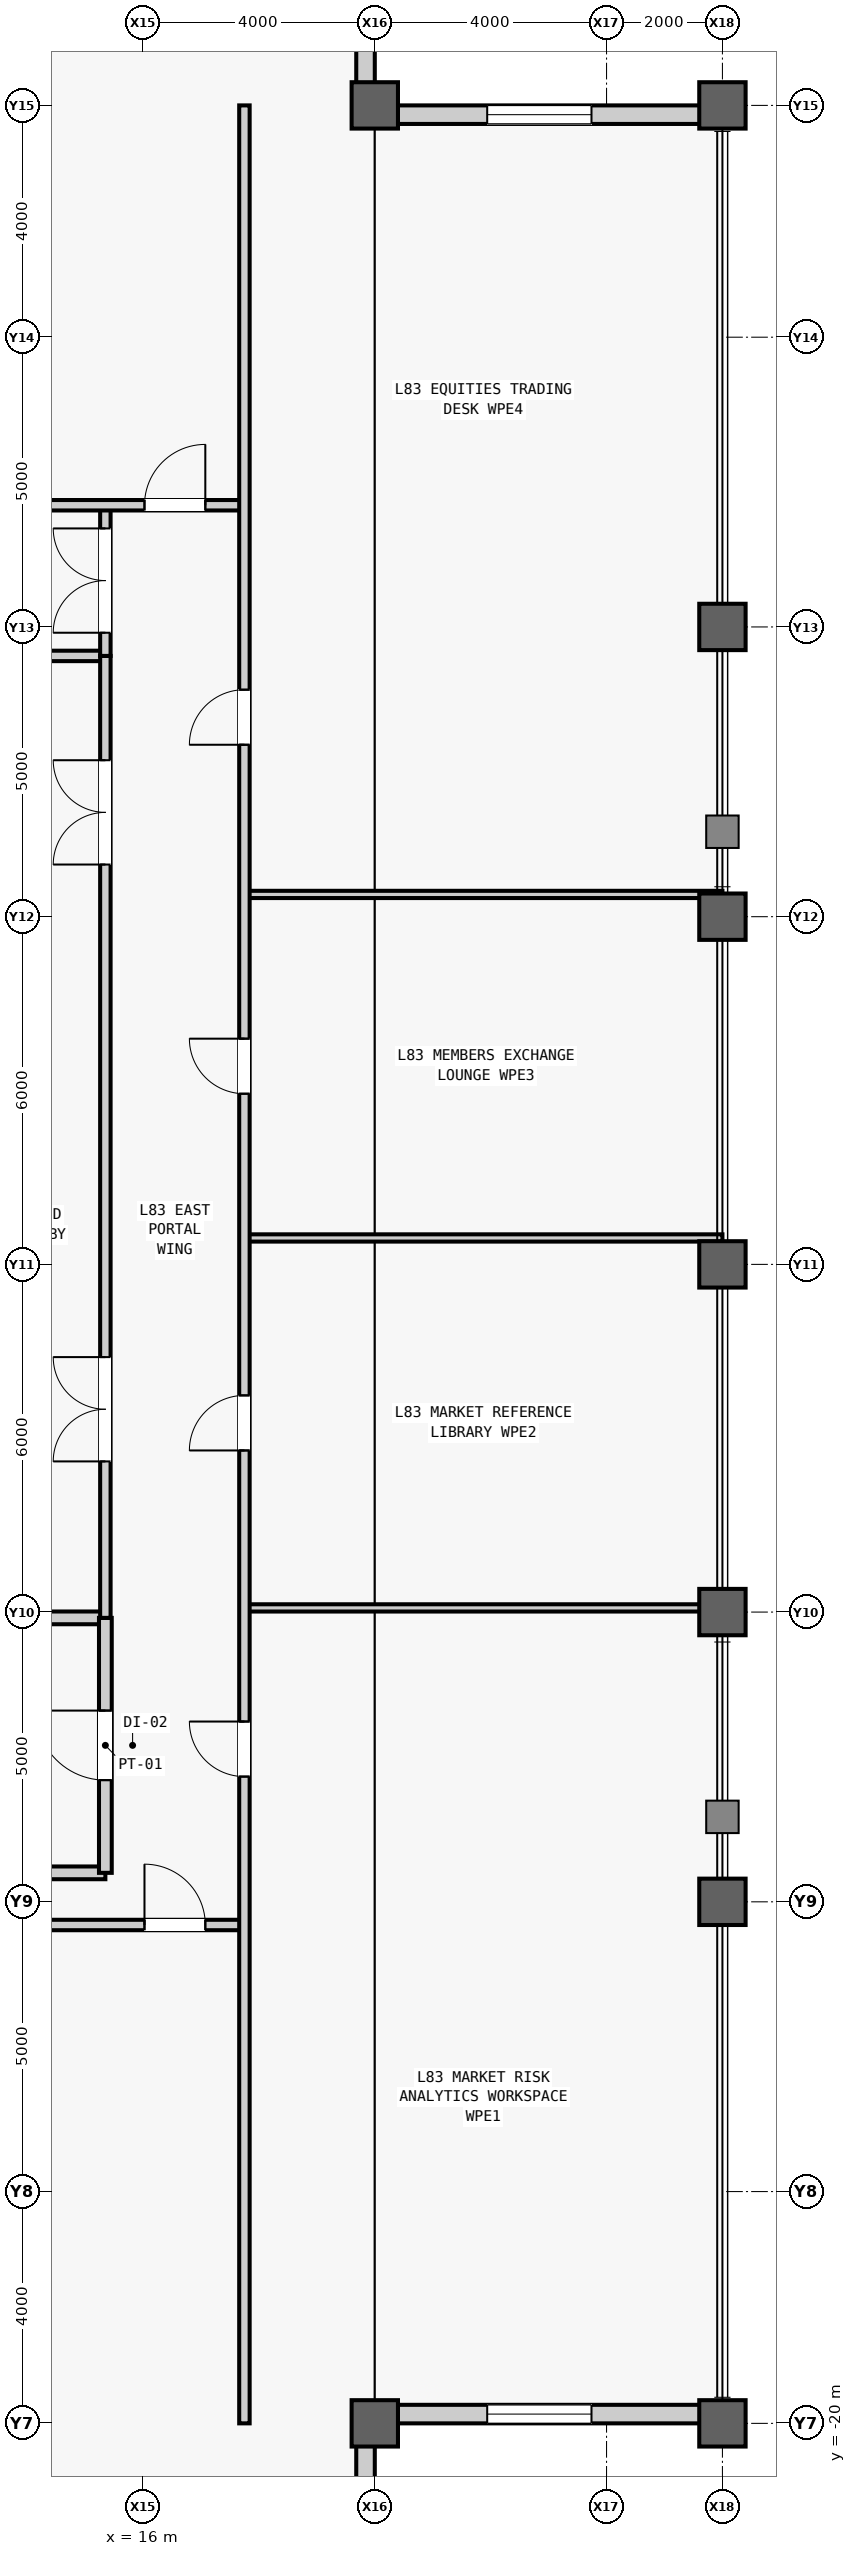
"""IFC4 building model, lengths in metres.
Left out: names, types, materials, properties, quantities, classifications, styles, units other than length and angle.
Written with IfcOpenShell. Run it as: python <this file> out.ifc"""

import sys

from ifc_helpers import new_model, si_unit, direction, frame, frame_2d, origin, origin_2d, place, context, subcontext, project, spatial, rectangle, hollow_rectangle, extrude, source, transform, mapped, element, fill, save


model = new_model("IFC4")
c1 = context("Model", 3, precision=1e-05, world=origin(), true_north=direction((0.0, 1.0)))
c2 = subcontext(c1, "Body", "Model", "MODEL_VIEW")
j1 = project(units=[si_unit("LENGTHUNIT", "METRE"), si_unit("PLANEANGLEUNIT", "RADIAN")], contexts=[c1])
p1 = place(None, origin())
s1 = spatial("IfcSite", under=j1, at=p1, CompositionType="ELEMENT")
p2 = place(p1, origin())
s2 = spatial("IfcBuilding", under=s1, at=p2, CompositionType="ELEMENT")
p3 = place(p2, frame((0.0, 0.0, 350.3)))
s3 = spatial("IfcBuildingStorey", under=s2, at=p3, CompositionType="ELEMENT", Elevation=350.3)
m1 = source(origin(), c2, "Body", "SweptSolid", [
    extrude(hollow_rectangle(XDim=0.8, YDim=0.8, WallThickness=0.045, at=origin_2d()), origin(), (0.0, 0.0, 1.0), 4.0),
])
for number, where, z_axis, x_axis in (
    (1, (20.0, -20.0, 0.0), (0.0, 0.0, 1.0), (1.0, 0.0, 0.0)),
    (2, (20.0, 20.0, 0.0), (0.0, 0.0, 1.0), (1.0, 0.0, 0.0)),
    (3, (26.0, -20.0, 0.0), (0.0, 0.0, 1.0), (1.0, 0.0, 0.0)),
    (4, (26.0, -11.0, 0.0), (0.0, 0.0, 1.0), (1.0, 0.0, 0.0)),
    (5, (26.0, -6.0, 0.0), (0.0, 0.0, 1.0), (1.0, 0.0, 0.0)),
    (6, (26.0, 0.0, 0.0), (0.0, 0.0, 1.0), (1.0, 0.0, 0.0)),
    (7, (26.0, 6.0, 0.0), (0.0, 0.0, 1.0), (1.0, 0.0, 0.0)),
    (8, (26.0, 11.0, 0.0), (0.0, 0.0, 1.0), (1.0, 0.0, 0.0)),
    (9, (26.0, 20.0, 0.0), (0.0, 0.0, 1.0), (1.0, 0.0, 0.0)),
):
    element("IfcColumn", number, at=place(p3, frame(where, z_axis=z_axis, x_axis=x_axis)), inside=s3, PredefinedType="COLUMN", context=c2, shape_type="MappedRepresentation", body=[
        mapped(m1, transform((0.0, 0.0, 0.0), scale=1.0)),
    ])
m2 = source(origin(), c2, "Body", "SweptSolid", [
    extrude(rectangle(XDim=5.68, YDim=0.32, at=frame_2d((2.84, 0.0))), origin(), (0.0, 0.0, 1.0), 3.191),
])
p4 = place(p3, frame((19.84, -25.68, 0.0), z_axis=(0.0, 0.0, 1.0), x_axis=(0.0, 1.0, 0.0)))
e10 = element("IfcWall", 10, at=p4, inside=s3, PredefinedType="STANDARD", context=c2, shape_type="MappedRepresentation", body=[
    mapped(m2, transform((0.0, 0.0, 0.0), scale=1.0)),
])
m3 = source(origin(), c2, "Body", "SweptSolid", [
    extrude(rectangle(XDim=1.8, YDim=2.4, at=frame_2d((0.9, 1.2))), frame((0.0, 0.17, 0.0), z_axis=(0.0, -1.0, 0.0), x_axis=(1.0, 0.0, 0.0)), (0.0, 0.0, 1.0), 0.34),
])
p5 = place(p4, frame((1.94, 0.0, 0.5)))
e11 = element("IfcOpeningElement", 11, at=p5, cuts=e10, PredefinedType="OPENING", context=c2, shape_type="MappedRepresentation", body=[
    mapped(m3, transform((0.0, 0.0, 0.0), scale=1.0)),
])
p6 = place(p3, frame((20.0, -19.84, 0.0), z_axis=(0.0, 0.0, 1.0), x_axis=(1.0, 0.0, 0.0)))
e12 = element("IfcWall", 12, at=p6, inside=s3, PredefinedType="STANDARD", context=c2, shape_type="MappedRepresentation", body=[
    mapped(m2, transform((0.0, 0.0, 0.0), scale=1.0)),
])
p7 = place(p6, frame((1.94, 0.0, 0.5)))
e13 = element("IfcOpeningElement", 13, at=p7, cuts=e12, PredefinedType="OPENING", context=c2, shape_type="MappedRepresentation", body=[
    mapped(m3, transform((0.0, 0.0, 0.0), scale=1.0)),
])
p8 = place(p3, frame((20.0, 19.84, 0.0), z_axis=(0.0, 0.0, 1.0), x_axis=(1.0, 0.0, 0.0)))
e14 = element("IfcWall", 14, at=p8, inside=s3, PredefinedType="STANDARD", context=c2, shape_type="MappedRepresentation", body=[
    mapped(m2, transform((0.0, 0.0, 0.0), scale=1.0)),
])
p9 = place(p8, frame((1.94, 0.0, 0.5)))
e15 = element("IfcOpeningElement", 15, at=p9, cuts=e14, PredefinedType="OPENING", context=c2, shape_type="MappedRepresentation", body=[
    mapped(m3, transform((0.0, 0.0, 0.0), scale=1.0)),
])
p10 = place(p3, frame((19.84, 20.0, 0.0), z_axis=(0.0, 0.0, 1.0), x_axis=(0.0, 1.0, 0.0)))
e16 = element("IfcWall", 16, at=p10, inside=s3, PredefinedType="STANDARD", context=c2, shape_type="MappedRepresentation", body=[
    mapped(m2, transform((0.0, 0.0, 0.0), scale=1.0)),
])
p11 = place(p10, frame((1.94, 0.0, 0.5)))
e17 = element("IfcOpeningElement", 17, at=p11, cuts=e16, PredefinedType="OPENING", context=c2, shape_type="MappedRepresentation", body=[
    mapped(m3, transform((0.0, 0.0, 0.0), scale=1.0)),
])
m4 = source(origin(), c2, "Body", "SweptSolid", [
    extrude(rectangle(XDim=4.05, YDim=0.22, at=frame_2d((2.025, 0.0))), origin(), (0.0, 0.0, 1.0), 3.74),
])
p12 = place(p3, frame((11.3, -10.5, 0.0), z_axis=(0.0, 0.0, 1.0), x_axis=(1.0, 0.0, 0.0)))
e18 = element("IfcWall", 18, at=p12, inside=s3, PredefinedType="PARTITIONING", context=c2, shape_type="MappedRepresentation", body=[
    mapped(m4, transform((0.0, 0.0, 0.0), scale=1.0)),
])
m5 = source(origin(), c2, "Body", "SweptSolid", [
    extrude(rectangle(XDim=4.05, YDim=0.22, at=frame_2d((2.025, 0.0))), origin(), (0.0, 0.0, 1.0), 3.124),
])
p13 = place(p3, frame((11.3, -6.1, 0.0), z_axis=(0.0, 0.0, 1.0), x_axis=(1.0, 0.0, 0.0)))
e19 = element("IfcWall", 19, at=p13, inside=s3, PredefinedType="PARTITIONING", context=c2, shape_type="MappedRepresentation", body=[
    mapped(m5, transform((0.0, 0.0, 0.0), scale=1.0)),
])
m6 = source(origin(), c2, "Body", "SweptSolid", [
    extrude(rectangle(XDim=4.4, YDim=0.22, at=frame_2d((2.2, 0.0))), origin(), (0.0, 0.0, 1.0), 3.74),
])
p14 = place(p3, frame((15.35, -10.5, 0.0), z_axis=(0.0, 0.0, 1.0), x_axis=(0.0, 1.0, 0.0)))
e20 = element("IfcWall", 20, at=p14, inside=s3, PredefinedType="PARTITIONING", context=c2, shape_type="MappedRepresentation", body=[
    mapped(m6, transform((0.0, 0.0, 0.0), scale=1.0)),
])
m7 = source(origin(), c2, "Body", "SweptSolid", [
    extrude(rectangle(XDim=1.2, YDim=2.2, at=frame_2d((0.6, 1.1))), frame((0.0, 0.12, 0.0), z_axis=(0.0, -1.0, 0.0), x_axis=(1.0, 0.0, 0.0)), (0.0, 0.0, 1.0), 0.24),
])
p15 = place(p14, frame((1.6, 0.0, 0.0)))
e21 = element("IfcOpeningElement", 21, at=p15, cuts=e20, PredefinedType="OPENING", context=c2, shape_type="MappedRepresentation", body=[
    mapped(m7, transform((0.0, 0.0, 0.0), scale=1.0)),
])
m8 = source(origin(), c2, "Body", "SweptSolid", [
    extrude(rectangle(XDim=4.05, YDim=0.18, at=frame_2d((2.025, 0.0))), origin(), (0.0, 0.0, 1.0), 3.74),
])
p16 = place(p3, frame((11.3, 10.5, 0.0), z_axis=(0.0, 0.0, 1.0), x_axis=(1.0, 0.0, 0.0)))
e22 = element("IfcWall", 22, at=p16, inside=s3, PredefinedType="PARTITIONING", context=c2, shape_type="MappedRepresentation", body=[
    mapped(m8, transform((0.0, 0.0, 0.0), scale=1.0)),
])
m9 = source(origin(), c2, "Body", "SweptSolid", [
    extrude(rectangle(XDim=16.6, YDim=0.18, at=frame_2d((8.3, 0.0))), origin(), (0.0, 0.0, 1.0), 3.74),
])
p17 = place(p3, frame((15.35, -6.1, 0.0), z_axis=(0.0, 0.0, 1.0), x_axis=(0.0, 1.0, 0.0)))
e23 = element("IfcWall", 23, at=p17, inside=s3, PredefinedType="PARTITIONING", context=c2, shape_type="MappedRepresentation", body=[
    mapped(m9, transform((0.0, 0.0, 0.0), scale=1.0)),
])
m10 = source(origin(), c2, "Body", "SweptSolid", [
    extrude(rectangle(XDim=1.8, YDim=2.25, at=frame_2d((0.9, 1.125))), frame((0.0, 0.1, 0.0), z_axis=(0.0, -1.0, 0.0), x_axis=(1.0, 0.0, 0.0)), (0.0, 0.0, 1.0), 0.2),
])
p18 = place(p17, frame((2.7, 0.0, 0.0)))
e24 = element("IfcOpeningElement", 24, at=p18, cuts=e23, PredefinedType="OPENING", context=c2, shape_type="MappedRepresentation", body=[
    mapped(m10, transform((0.0, 0.0, 0.0), scale=1.0)),
])
p19 = place(p17, frame((13.0, 0.0, 0.0)))
e25 = element("IfcOpeningElement", 25, at=p19, cuts=e23, PredefinedType="OPENING", context=c2, shape_type="MappedRepresentation", body=[
    mapped(m10, transform((0.0, 0.0, 0.0), scale=1.0)),
])
m11 = source(origin(), c2, "Body", "SweptSolid", [
    extrude(rectangle(XDim=2.6, YDim=0.18, at=frame_2d((1.3, 0.0))), origin(), (0.0, 0.0, 1.0), 3.74),
])
p20 = place(p3, frame((15.35, 10.5, 0.0), z_axis=(0.0, 0.0, 1.0), x_axis=(0.0, 1.0, 0.0)))
e26 = element("IfcWall", 26, at=p20, inside=s3, PredefinedType="PARTITIONING", context=c2, shape_type="MappedRepresentation", body=[
    mapped(m11, transform((0.0, 0.0, 0.0), scale=1.0)),
])
p21 = place(p20, frame((0.4, 0.0, 0.0)))
e27 = element("IfcOpeningElement", 27, at=p21, cuts=e26, PredefinedType="OPENING", context=c2, shape_type="MappedRepresentation", body=[
    mapped(m10, transform((0.0, 0.0, 0.0), scale=1.0)),
])
m12 = source(origin(), c2, "Body", "SweptSolid", [
    extrude(rectangle(XDim=12.7, YDim=0.18, at=frame_2d((6.35, 0.0))), origin(), (0.0, 0.0, 1.0), 2.79),
])
p22 = place(p3, frame((5.05, -11.4, 0.0), z_axis=(0.0, 0.0, 1.0), x_axis=(1.0, 0.0, 0.0)))
e28 = element("IfcWall", 28, at=p22, inside=s3, PredefinedType="PARTITIONING", context=c2, shape_type="MappedRepresentation", body=[
    mapped(m12, transform((0.0, 0.0, 0.0), scale=1.0)),
])
m13 = source(origin(), c2, "Body", "SweptSolid", [
    extrude(rectangle(XDim=1.05, YDim=2.2, at=frame_2d((0.525, 1.1))), frame((0.0, 0.1, 0.0), z_axis=(0.0, -1.0, 0.0), x_axis=(1.0, 0.0, 0.0)), (0.0, 0.0, 1.0), 0.2),
])
p23 = place(p22, frame((10.975, 0.0, 0.0)))
e29 = element("IfcOpeningElement", 29, at=p23, cuts=e28, PredefinedType="OPENING", context=c2, shape_type="MappedRepresentation", body=[
    mapped(m13, transform((0.0, 0.0, 0.0), scale=1.0)),
])
m14 = source(origin(), c2, "Body", "SweptSolid", [
    extrude(rectangle(XDim=12.65, YDim=0.18, at=frame_2d((6.325, 0.0))), origin(), (0.0, 0.0, 1.0), 3.74),
])
p24 = place(p3, frame((5.1, 13.1, 0.0), z_axis=(0.0, 0.0, 1.0), x_axis=(1.0, 0.0, 0.0)))
e30 = element("IfcWall", 30, at=p24, inside=s3, PredefinedType="PARTITIONING", context=c2, shape_type="MappedRepresentation", body=[
    mapped(m14, transform((0.0, 0.0, 0.0), scale=1.0)),
])
p25 = place(p24, frame((10.925, 0.0, 0.0)))
e31 = element("IfcOpeningElement", 31, at=p25, cuts=e30, PredefinedType="OPENING", context=c2, shape_type="MappedRepresentation", body=[
    mapped(m13, transform((0.0, 0.0, 0.0), scale=1.0)),
])
m15 = source(origin(), c2, "Body", "SweptSolid", [
    extrude(rectangle(XDim=8.25, YDim=0.125, at=frame_2d((4.125, 0.0))), origin(), (0.0, 0.0, 1.0), 3.124),
])
p26 = place(p3, frame((17.75, -5.928, 0.0), z_axis=(0.0, 0.0, 1.0), x_axis=(1.0, 0.0, 0.0)))
e32 = element("IfcWall", 32, at=p26, inside=s3, PredefinedType="PARTITIONING", context=c2, shape_type="MappedRepresentation", body=[
    mapped(m15, transform((0.0, 0.0, 0.0), scale=1.0)),
])
m16 = source(origin(), c2, "Body", "SweptSolid", [
    extrude(rectangle(XDim=8.25, YDim=0.125, at=frame_2d((4.125, 0.0))), origin(), (0.0, 0.0, 1.0), 3.74),
])
for number, where, z_axis, x_axis in (
    (33, (17.75, 0.456, 0.0), (0.0, 0.0, 1.0), (1.0, 0.0, 0.0)),
    (34, (17.75, 6.384, 0.0), (0.0, 0.0, 1.0), (1.0, 0.0, 0.0)),
):
    element("IfcWall", number, at=place(p3, frame(where, z_axis=z_axis, x_axis=x_axis)), inside=s3, PredefinedType="PARTITIONING", context=c2, shape_type="MappedRepresentation", body=[
        mapped(m16, transform((0.0, 0.0, 0.0), scale=1.0)),
    ])
m17 = source(origin(), c2, "Body", "SweptSolid", [
    extrude(rectangle(XDim=40.0, YDim=0.18, at=frame_2d((20.0, 0.0))), origin(), (0.0, 0.0, 1.0), 3.74),
])
p27 = place(p3, frame((17.75, -20.0, 0.0), z_axis=(0.0, 0.0, 1.0), x_axis=(0.0, 1.0, 0.0)))
e35 = element("IfcWall", 35, at=p27, inside=s3, PredefinedType="PARTITIONING", context=c2, shape_type="MappedRepresentation", body=[
    mapped(m17, transform((0.0, 0.0, 0.0), scale=1.0)),
])
m18 = source(origin(), c2, "Body", "SweptSolid", [
    extrude(rectangle(XDim=0.95, YDim=2.15, at=frame_2d((0.475, 1.075))), frame((0.0, 0.1, 0.0), z_axis=(0.0, -1.0, 0.0), x_axis=(1.0, 0.0, 0.0)), (0.0, 0.0, 1.0), 0.2),
])
p28 = place(p27, frame((11.161, 0.0, 0.0)))
e36 = element("IfcOpeningElement", 36, at=p28, cuts=e35, PredefinedType="OPENING", context=c2, shape_type="MappedRepresentation", body=[
    mapped(m18, transform((0.0, 0.0, 0.0), scale=1.0)),
])
p29 = place(p27, frame((16.789, 0.0, 0.0)))
e37 = element("IfcOpeningElement", 37, at=p29, cuts=e35, PredefinedType="OPENING", context=c2, shape_type="MappedRepresentation", body=[
    mapped(m18, transform((0.0, 0.0, 0.0), scale=1.0)),
])
p30 = place(p27, frame((22.945, 0.0, 0.0)))
e38 = element("IfcOpeningElement", 38, at=p30, cuts=e35, PredefinedType="OPENING", context=c2, shape_type="MappedRepresentation", body=[
    mapped(m18, transform((0.0, 0.0, 0.0), scale=1.0)),
])
p31 = place(p27, frame((28.967, 0.0, 0.0)))
e39 = element("IfcOpeningElement", 39, at=p31, cuts=e35, PredefinedType="OPENING", context=c2, shape_type="MappedRepresentation", body=[
    mapped(m18, transform((0.0, 0.0, 0.0), scale=1.0)),
])
m19 = source(origin(), c2, "Body", "SweptSolid", [
    extrude(rectangle(XDim=1.8, YDim=2.4, at=frame_2d((0.9, 1.2))), frame((0.0, 0.03, 0.0), z_axis=(0.0, -1.0, 0.0), x_axis=(1.0, 0.0, 0.0)), (0.0, 0.0, 1.0), 0.06),
])
p32 = place(p7, origin())
e40 = element("IfcWindow", 40, at=p32, inside=s3, PartitioningType="SINGLE_PANEL", PredefinedType="WINDOW", context=c2, shape_type="MappedRepresentation", body=[
    mapped(m19, transform((0.0, 0.0, 0.0), scale=1.0)),
])
fill(e13, e40)
p33 = place(p9, origin())
e41 = element("IfcWindow", 41, at=p33, inside=s3, PartitioningType="SINGLE_PANEL", PredefinedType="WINDOW", context=c2, shape_type="MappedRepresentation", body=[
    mapped(m19, transform((0.0, 0.0, 0.0), scale=1.0)),
])
fill(e15, e41)
m20 = source(origin(), c2, "Body", "SweptSolid", [
    extrude(rectangle(XDim=1.2, YDim=2.2, at=frame_2d((0.6, 1.1))), frame((0.0, 0.025, 0.0), z_axis=(0.0, -1.0, 0.0), x_axis=(1.0, 0.0, 0.0)), (0.0, 0.0, 1.0), 0.05),
])
p34 = place(p15, origin())
e42 = element("IfcDoor", 42, at=p34, inside=s3, OperationType="SINGLE_SWING_RIGHT", PredefinedType="DOOR", context=c2, shape_type="MappedRepresentation", body=[
    mapped(m20, transform((0.0, 0.0, 0.0), scale=1.0)),
])
fill(e21, e42)
m21 = source(origin(), c2, "Body", "SweptSolid", [
    extrude(rectangle(XDim=1.8, YDim=2.25, at=frame_2d((0.9, 1.125))), frame((0.0, 0.025, 0.0), z_axis=(0.0, -1.0, 0.0), x_axis=(1.0, 0.0, 0.0)), (0.0, 0.0, 1.0), 0.05),
])
p35 = place(p18, origin())
e43 = element("IfcDoor", 43, at=p35, inside=s3, OperationType="SINGLE_SWING_RIGHT", PredefinedType="DOOR", context=c2, shape_type="MappedRepresentation", body=[
    mapped(m21, transform((0.0, 0.0, 0.0), scale=1.0)),
])
fill(e24, e43)
p36 = place(p19, origin())
e44 = element("IfcDoor", 44, at=p36, inside=s3, OperationType="SINGLE_SWING_LEFT", PredefinedType="DOOR", context=c2, shape_type="MappedRepresentation", body=[
    mapped(m21, transform((0.0, 0.0, 0.0), scale=1.0)),
])
fill(e25, e44)
p37 = place(p21, origin())
e45 = element("IfcDoor", 45, at=p37, inside=s3, OperationType="DOUBLE_DOOR_SINGLE_SWING", PredefinedType="DOOR", context=c2, shape_type="MappedRepresentation", body=[
    mapped(m21, transform((0.0, 0.0, 0.0), scale=1.0)),
])
fill(e27, e45)
m22 = source(origin(), c2, "Body", "SweptSolid", [
    extrude(rectangle(XDim=1.05, YDim=2.2, at=frame_2d((0.525, 1.1))), frame((0.0, 0.025, 0.0), z_axis=(0.0, -1.0, 0.0), x_axis=(1.0, 0.0, 0.0)), (0.0, 0.0, 1.0), 0.05),
])
p38 = place(p23, origin())
e46 = element("IfcDoor", 46, at=p38, inside=s3, OperationType="SINGLE_SWING_LEFT", PredefinedType="DOOR", context=c2, shape_type="MappedRepresentation", body=[
    mapped(m22, transform((0.0, 0.0, 0.0), scale=1.0)),
])
fill(e29, e46)
p39 = place(p25, origin())
e47 = element("IfcDoor", 47, at=p39, inside=s3, OperationType="SINGLE_SWING_RIGHT", PredefinedType="DOOR", context=c2, shape_type="MappedRepresentation", body=[
    mapped(m22, transform((0.0, 0.0, 0.0), scale=1.0)),
])
fill(e31, e47)
m23 = source(origin(), c2, "Body", "SweptSolid", [
    extrude(rectangle(XDim=0.95, YDim=2.15, at=frame_2d((0.475, 1.075))), frame((0.0, 0.025, 0.0), z_axis=(0.0, -1.0, 0.0), x_axis=(1.0, 0.0, 0.0)), (0.0, 0.0, 1.0), 0.05),
])
p40 = place(p28, origin())
e48 = element("IfcDoor", 48, at=p40, inside=s3, OperationType="SINGLE_SWING_RIGHT", PredefinedType="DOOR", context=c2, shape_type="MappedRepresentation", body=[
    mapped(m23, transform((0.0, 0.0, 0.0), scale=1.0)),
])
fill(e36, e48)
p41 = place(p29, origin())
e49 = element("IfcDoor", 49, at=p41, inside=s3, OperationType="SINGLE_SWING_LEFT", PredefinedType="DOOR", context=c2, shape_type="MappedRepresentation", body=[
    mapped(m23, transform((0.0, 0.0, 0.0), scale=1.0)),
])
fill(e37, e49)
p42 = place(p30, origin())
e50 = element("IfcDoor", 50, at=p42, inside=s3, OperationType="SINGLE_SWING_RIGHT", PredefinedType="DOOR", context=c2, shape_type="MappedRepresentation", body=[
    mapped(m23, transform((0.0, 0.0, 0.0), scale=1.0)),
])
fill(e38, e50)
p43 = place(p31, origin())
e51 = element("IfcDoor", 51, at=p43, inside=s3, OperationType="SINGLE_SWING_LEFT", PredefinedType="DOOR", context=c2, shape_type="MappedRepresentation", body=[
    mapped(m23, transform((0.0, 0.0, 0.0), scale=1.0)),
])
fill(e39, e51)
save(model, sys.argv[1])
